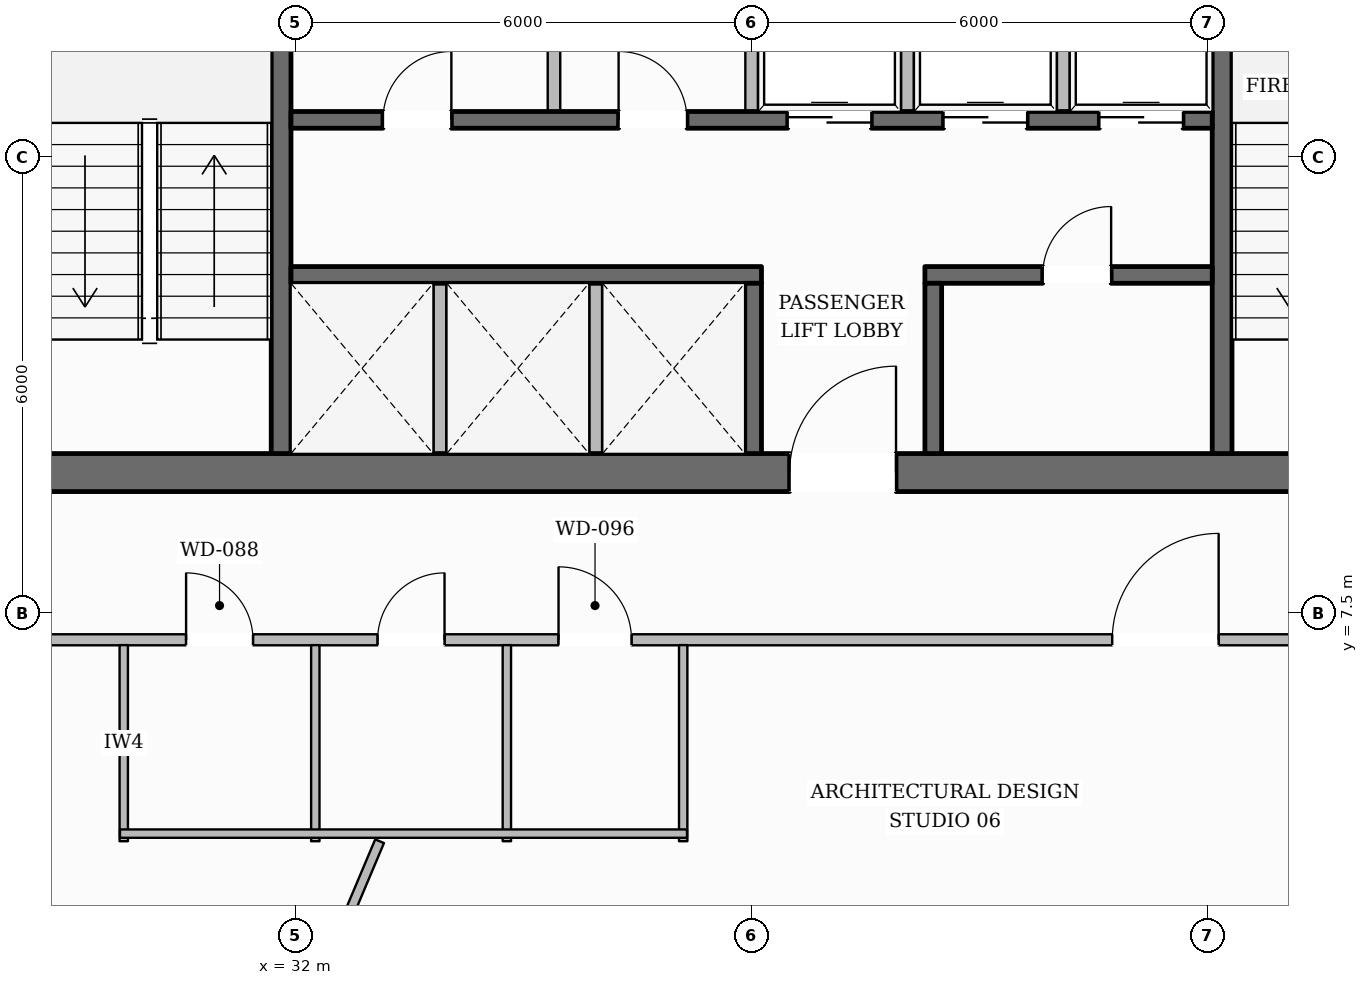
"""IFC4 building model, lengths in metres.
Left out: names, types, materials, properties, quantities, classifications, styles, units other than length and angle.
Written with IfcOpenShell. Run it as: python <this file> out.ifc"""

import sys

from ifc_helpers import new_model, si_unit, direction, frame, frame_2d, origin, place, context, subcontext, project, spatial, rectangle, extrude, element, fill, save


model = new_model("IFC4")
c1 = context("Model", 3, precision=1e-05, world=origin(), true_north=direction((0.0, 1.0)))
c2 = subcontext(c1, "Body", "Model", "MODEL_VIEW")
j1 = project(units=[si_unit("LENGTHUNIT", "METRE"), si_unit("PLANEANGLEUNIT", "RADIAN")], contexts=[c1])
p1 = place(None, origin())
s1 = spatial("IfcSite", under=j1, at=p1, CompositionType="ELEMENT")
p2 = place(p1, origin())
s2 = spatial("IfcBuilding", under=s1, at=p2, CompositionType="ELEMENT")
p3 = place(p2, frame((0.0, 0.0, 108.6)))
s3 = spatial("IfcBuildingStorey", under=s2, at=p3, CompositionType="ELEMENT", Elevation=108.6)
p4 = place(p3, frame((27.98, 9.35, 0.0), z_axis=(0.0, 0.0, 1.0), x_axis=(1.0, 0.0, 0.0)))
e1 = element("IfcWall", 1, at=p4, inside=s3, PredefinedType="SOLIDWALL", context=c2, shape_type="SweptSolid", body=[
    extrude(rectangle(XDim=20.04, YDim=0.5, at=frame_2d((10.02, 0.0))), origin(), (0.0, 0.0, 1.0), 3.6),
])
p5 = place(p4, frame((10.52, 0.0, 0.0)))
e2 = element("IfcOpeningElement", 2, at=p5, cuts=e1, PredefinedType="OPENING", context=c2, shape_type="SweptSolid", body=[
    extrude(rectangle(XDim=1.4, YDim=2.2, at=frame_2d((0.7, 1.1))), frame((0.0, 0.26, 0.0), z_axis=(0.0, -1.0, 0.0), x_axis=(1.0, 0.0, 0.0)), (0.0, 0.0, 1.0), 0.52),
])
p6 = place(p3, frame((31.81, 9.6, 0.0), z_axis=(0.0, 0.0, 1.0), x_axis=(0.0, 1.0, 0.0)))
e3 = element("IfcWall", 3, at=p6, inside=s3, PredefinedType="SHEAR", context=c2, shape_type="SweptSolid", body=[
    extrude(rectangle(XDim=13.0, YDim=0.26, at=frame_2d((6.5, 0.0))), origin(), (0.0, 0.0, 1.0), 3.6),
])
p7 = place(p6, frame((10.925, 0.0, 0.0)))
e4 = element("IfcOpeningElement", 4, at=p7, cuts=e3, PredefinedType="OPENING", context=c2, shape_type="SweptSolid", body=[
    extrude(rectangle(XDim=1.25, YDim=2.25, at=frame_2d((0.625, 1.125))), frame((0.0, 0.14, 0.0), z_axis=(0.0, -1.0, 0.0), x_axis=(1.0, 0.0, 0.0)), (0.0, 0.0, 1.0), 0.28),
])
p8 = place(p3, frame((44.19, 9.6, 0.0), z_axis=(0.0, 0.0, 1.0), x_axis=(0.0, 1.0, 0.0)))
e5 = element("IfcWall", 5, at=p8, inside=s3, PredefinedType="SHEAR", context=c2, shape_type="SweptSolid", body=[
    extrude(rectangle(XDim=13.0, YDim=0.26, at=frame_2d((6.5, 0.0))), origin(), (0.0, 0.0, 1.0), 3.6),
])
p9 = place(p8, frame((10.925, 0.0, 0.0)))
e6 = element("IfcOpeningElement", 6, at=p9, cuts=e5, PredefinedType="OPENING", context=c2, shape_type="SweptSolid", body=[
    extrude(rectangle(XDim=1.25, YDim=2.25, at=frame_2d((0.625, 1.125))), frame((0.0, 0.14, 0.0), z_axis=(0.0, -1.0, 0.0), x_axis=(1.0, 0.0, 0.0)), (0.0, 0.0, 1.0), 0.28),
])
p10 = place(p3, frame((31.94, 13.99, 0.0), z_axis=(0.0, 0.0, 1.0), x_axis=(1.0, 0.0, 0.0)))
e7 = element("IfcWall", 7, at=p10, inside=s3, PredefinedType="SOLIDWALL", context=c2, shape_type="SweptSolid", body=[
    extrude(rectangle(XDim=12.12, YDim=0.22, at=frame_2d((6.06, 0.0))), origin(), (0.0, 0.0, 1.0), 3.6),
])
p11 = place(p10, frame((1.21, 0.0, 0.0)))
e8 = element("IfcOpeningElement", 8, at=p11, cuts=e7, PredefinedType="OPENING", context=c2, shape_type="SweptSolid", body=[
    extrude(rectangle(XDim=0.9, YDim=2.1, at=frame_2d((0.45, 1.05))), frame((0.0, 0.12, 0.0), z_axis=(0.0, -1.0, 0.0), x_axis=(1.0, 0.0, 0.0)), (0.0, 0.0, 1.0), 0.24),
])
p12 = place(p10, frame((4.31, 0.0, 0.0)))
e9 = element("IfcOpeningElement", 9, at=p12, cuts=e7, PredefinedType="OPENING", context=c2, shape_type="SweptSolid", body=[
    extrude(rectangle(XDim=0.9, YDim=2.1, at=frame_2d((0.45, 1.05))), frame((0.0, 0.12, 0.0), z_axis=(0.0, -1.0, 0.0), x_axis=(1.0, 0.0, 0.0)), (0.0, 0.0, 1.0), 0.24),
])
p13 = place(p10, frame((6.535, 0.0, 0.0)))
e10 = element("IfcOpeningElement", 10, at=p13, cuts=e7, PredefinedType="OPENING", context=c2, shape_type="SweptSolid", body=[
    extrude(rectangle(XDim=1.1, YDim=2.2, at=frame_2d((0.55, 1.1))), frame((0.0, 0.12, 0.0), z_axis=(0.0, -1.0, 0.0), x_axis=(1.0, 0.0, 0.0)), (0.0, 0.0, 1.0), 0.24),
])
p14 = place(p10, frame((8.585, 0.0, 0.0)))
e11 = element("IfcOpeningElement", 11, at=p14, cuts=e7, PredefinedType="OPENING", context=c2, shape_type="SweptSolid", body=[
    extrude(rectangle(XDim=1.1, YDim=2.2, at=frame_2d((0.55, 1.1))), frame((0.0, 0.12, 0.0), z_axis=(0.0, -1.0, 0.0), x_axis=(1.0, 0.0, 0.0)), (0.0, 0.0, 1.0), 0.24),
])
p15 = place(p10, frame((10.635, 0.0, 0.0)))
e12 = element("IfcOpeningElement", 12, at=p15, cuts=e7, PredefinedType="OPENING", context=c2, shape_type="SweptSolid", body=[
    extrude(rectangle(XDim=1.1, YDim=2.2, at=frame_2d((0.55, 1.1))), frame((0.0, 0.12, 0.0), z_axis=(0.0, -1.0, 0.0), x_axis=(1.0, 0.0, 0.0)), (0.0, 0.0, 1.0), 0.24),
])
p16 = place(p3, frame((31.94, 11.95, 0.0), z_axis=(0.0, 0.0, 1.0), x_axis=(1.0, 0.0, 0.0)))
e13 = element("IfcWall", 13, at=p16, inside=s3, PredefinedType="SOLIDWALL", context=c2, shape_type="SweptSolid", body=[
    extrude(rectangle(XDim=6.19, YDim=0.22, at=frame_2d((3.095, 0.0))), origin(), (0.0, 0.0, 1.0), 3.6),
])
p17 = place(p3, frame((40.28, 11.95, 0.0), z_axis=(0.0, 0.0, 1.0), x_axis=(1.0, 0.0, 0.0)))
e14 = element("IfcWall", 14, at=p17, inside=s3, PredefinedType="SOLIDWALL", context=c2, shape_type="SweptSolid", body=[
    extrude(rectangle(XDim=3.78, YDim=0.22, at=frame_2d((1.89, 0.0))), origin(), (0.0, 0.0, 1.0), 3.6),
])
p18 = place(p17, frame((1.55, 0.0, 0.0)))
e15 = element("IfcOpeningElement", 15, at=p18, cuts=e14, PredefinedType="OPENING", context=c2, shape_type="SweptSolid", body=[
    extrude(rectangle(XDim=0.9, YDim=2.1, at=frame_2d((0.45, 1.05))), frame((0.0, 0.12, 0.0), z_axis=(0.0, -1.0, 0.0), x_axis=(1.0, 0.0, 0.0)), (0.0, 0.0, 1.0), 0.24),
])
for number, where, z_axis, x_axis in (
    (16, (38.02, 9.6, 0.0), (0.0, 0.0, 1.0), (0.0, 1.0, 0.0)),
    (17, (40.39, 9.6, 0.0), (0.0, 0.0, 1.0), (0.0, 1.0, 0.0)),
):
    element("IfcWall", number, at=place(p3, frame(where, z_axis=z_axis, x_axis=x_axis)), inside=s3, PredefinedType="SOLIDWALL", context=c2, shape_type="SweptSolid", body=[
        extrude(rectangle(XDim=2.24, YDim=0.22, at=frame_2d((1.12, 0.0))), origin(), (0.0, 0.0, 1.0), 3.6),
    ])
p19 = place(p3, frame((14.155, 13.347, 0.0), z_axis=(0.0, 0.0, 1.0), x_axis=(0.493868426836, 0.869536644986, 0.0)))
e18 = element("IfcWall", 18, at=p19, inside=s3, PredefinedType="STANDARD", context=c2, shape_type="SweptSolid", body=[
    extrude(rectangle(XDim=36.121, YDim=0.38, at=frame_2d((18.061, 0.0))), origin(), (0.0, 0.0, 1.0), 3.059),
])
p20 = place(p19, frame((31.935, 0.0, 0.65)))
e19 = element("IfcOpeningElement", 19, at=p20, cuts=e18, PredefinedType="OPENING", context=c2, shape_type="SweptSolid", body=[
    extrude(rectangle(XDim=1.55, YDim=1.75, at=frame_2d((0.775, 0.875))), frame((0.0, 0.2, 0.0), z_axis=(0.0, -1.0, 0.0), x_axis=(1.0, 0.0, 0.0)), (0.0, 0.0, 1.0), 0.4),
])
p21 = place(p19, frame((26.073, 0.0, 0.65)))
e20 = element("IfcOpeningElement", 20, at=p21, cuts=e18, PredefinedType="OPENING", context=c2, shape_type="SweptSolid", body=[
    extrude(rectangle(XDim=1.55, YDim=1.75, at=frame_2d((0.775, 0.875))), frame((0.0, 0.2, 0.0), z_axis=(0.0, -1.0, 0.0), x_axis=(1.0, 0.0, 0.0)), (0.0, 0.0, 1.0), 0.4),
])
p22 = place(p19, frame((14.352, 0.0, 0.65)))
e21 = element("IfcOpeningElement", 21, at=p22, cuts=e18, PredefinedType="OPENING", context=c2, shape_type="SweptSolid", body=[
    extrude(rectangle(XDim=1.55, YDim=1.75, at=frame_2d((0.775, 0.875))), frame((0.0, 0.2, 0.0), z_axis=(0.0, -1.0, 0.0), x_axis=(1.0, 0.0, 0.0)), (0.0, 0.0, 1.0), 0.4),
])
p23 = place(p19, frame((8.491, 0.0, 0.65)))
e22 = element("IfcOpeningElement", 22, at=p23, cuts=e18, PredefinedType="OPENING", context=c2, shape_type="SweptSolid", body=[
    extrude(rectangle(XDim=1.55, YDim=1.75, at=frame_2d((0.775, 0.875))), frame((0.0, 0.2, 0.0), z_axis=(0.0, -1.0, 0.0), x_axis=(1.0, 0.0, 0.0)), (0.0, 0.0, 1.0), 0.4),
])
p24 = place(p19, frame((2.63, 0.0, 0.65)))
e23 = element("IfcOpeningElement", 23, at=p24, cuts=e18, PredefinedType="OPENING", context=c2, shape_type="SweptSolid", body=[
    extrude(rectangle(XDim=1.55, YDim=1.75, at=frame_2d((0.775, 0.875))), frame((0.0, 0.2, 0.0), z_axis=(0.0, -1.0, 0.0), x_axis=(1.0, 0.0, 0.0)), (0.0, 0.0, 1.0), 0.4),
])
p25 = place(p3, frame((44.12, 44.689, 0.0), z_axis=(0.0, 0.0, 1.0), x_axis=(0.498376840975, -0.866960509124, 0.0)))
e24 = element("IfcWall", 24, at=p25, inside=s3, PredefinedType="STANDARD", context=c2, shape_type="SweptSolid", body=[
    extrude(rectangle(XDim=36.441, YDim=0.38, at=frame_2d((18.22, 0.0))), origin(), (0.0, 0.0, 1.0), 3.059),
])
p26 = place(p25, frame((32.234, 0.0, 0.65)))
e25 = element("IfcOpeningElement", 25, at=p26, cuts=e24, PredefinedType="OPENING", context=c2, shape_type="SweptSolid", body=[
    extrude(rectangle(XDim=1.55, YDim=1.75, at=frame_2d((0.775, 0.875))), frame((0.0, 0.2, 0.0), z_axis=(0.0, -1.0, 0.0), x_axis=(1.0, 0.0, 0.0)), (0.0, 0.0, 1.0), 0.4),
])
p27 = place(p25, frame((26.319, 0.0, 0.65)))
e26 = element("IfcOpeningElement", 26, at=p27, cuts=e24, PredefinedType="OPENING", context=c2, shape_type="SweptSolid", body=[
    extrude(rectangle(XDim=1.55, YDim=1.75, at=frame_2d((0.775, 0.875))), frame((0.0, 0.2, 0.0), z_axis=(0.0, -1.0, 0.0), x_axis=(1.0, 0.0, 0.0)), (0.0, 0.0, 1.0), 0.4),
])
p28 = place(p25, frame((14.489, 0.0, 0.65)))
e27 = element("IfcOpeningElement", 27, at=p28, cuts=e24, PredefinedType="OPENING", context=c2, shape_type="SweptSolid", body=[
    extrude(rectangle(XDim=1.55, YDim=1.75, at=frame_2d((0.775, 0.875))), frame((0.0, 0.2, 0.0), z_axis=(0.0, -1.0, 0.0), x_axis=(1.0, 0.0, 0.0)), (0.0, 0.0, 1.0), 0.4),
])
p29 = place(p25, frame((8.573, 0.0, 0.65)))
e28 = element("IfcOpeningElement", 28, at=p29, cuts=e24, PredefinedType="OPENING", context=c2, shape_type="SweptSolid", body=[
    extrude(rectangle(XDim=1.55, YDim=1.75, at=frame_2d((0.775, 0.875))), frame((0.0, 0.2, 0.0), z_axis=(0.0, -1.0, 0.0), x_axis=(1.0, 0.0, 0.0)), (0.0, 0.0, 1.0), 0.4),
])
p30 = place(p25, frame((2.658, 0.0, 0.65)))
e29 = element("IfcOpeningElement", 29, at=p30, cuts=e24, PredefinedType="OPENING", context=c2, shape_type="SweptSolid", body=[
    extrude(rectangle(XDim=1.55, YDim=1.75, at=frame_2d((0.775, 0.875))), frame((0.0, 0.2, 0.0), z_axis=(0.0, -1.0, 0.0), x_axis=(1.0, 0.0, 0.0)), (0.0, 0.0, 1.0), 0.4),
])
for number, where, z_axis, x_axis in (
    (30, (33.9, 9.55, 0.0), (0.0, 0.0, 1.0), (0.0, 1.0, 0.0)),
    (31, (35.95, 9.55, 0.0), (0.0, 0.0, 1.0), (0.0, 1.0, 0.0)),
):
    element("IfcWall", number, at=place(p3, frame(where, z_axis=z_axis, x_axis=x_axis)), inside=s3, PredefinedType="PARTITIONING", context=c2, shape_type="SweptSolid", body=[
        extrude(rectangle(XDim=2.29, YDim=0.165, at=frame_2d((1.145, 0.0))), origin(), (0.0, 0.0, 1.0), 3.6),
    ])
for number, where, z_axis, x_axis in (
    (32, (38.0, 14.1, 0.0), (0.0, 0.0, 1.0), (0.0, 1.0, 0.0)),
    (33, (35.4, 14.1, 0.0), (0.0, 0.0, 1.0), (0.0, 1.0, 0.0)),
    (34, (40.05, 14.1, 0.0), (0.0, 0.0, 1.0), (0.0, 1.0, 0.0)),
    (35, (42.1, 14.1, 0.0), (0.0, 0.0, 1.0), (0.0, 1.0, 0.0)),
):
    element("IfcWall", number, at=place(p3, frame(where, z_axis=z_axis, x_axis=x_axis)), inside=s3, PredefinedType="PARTITIONING", context=c2, shape_type="SweptSolid", body=[
        extrude(rectangle(XDim=2.24, YDim=0.165, at=frame_2d((1.12, 0.0))), origin(), (0.0, 0.0, 1.0), 3.6),
    ])
p31 = place(p3, frame((26.03, 7.15, 0.0), z_axis=(0.0, 0.0, 1.0), x_axis=(1.0, 0.0, 0.0)))
e36 = element("IfcWall", 36, at=p31, inside=s3, PredefinedType="PARTITIONING", context=c2, shape_type="SweptSolid", body=[
    extrude(rectangle(XDim=23.94, YDim=0.145, at=frame_2d((11.97, 0.0))), origin(), (0.0, 0.0, 1.0), 3.6),
])
p32 = place(p31, frame((4.53, 0.0, 0.0)))
e37 = element("IfcOpeningElement", 37, at=p32, cuts=e36, PredefinedType="OPENING", context=c2, shape_type="SweptSolid", body=[
    extrude(rectangle(XDim=0.88, YDim=2.1, at=frame_2d((0.44, 1.05))), frame((0.0, 0.083, 0.0), z_axis=(0.0, -1.0, 0.0), x_axis=(1.0, 0.0, 0.0)), (0.0, 0.0, 1.0), 0.165),
])
p33 = place(p31, frame((7.05, 0.0, 0.0)))
e38 = element("IfcOpeningElement", 38, at=p33, cuts=e36, PredefinedType="OPENING", context=c2, shape_type="SweptSolid", body=[
    extrude(rectangle(XDim=0.88, YDim=2.1, at=frame_2d((0.44, 1.05))), frame((0.0, 0.083, 0.0), z_axis=(0.0, -1.0, 0.0), x_axis=(1.0, 0.0, 0.0)), (0.0, 0.0, 1.0), 0.165),
])
p34 = place(p31, frame((9.43, 0.0, 0.0)))
e39 = element("IfcOpeningElement", 39, at=p34, cuts=e36, PredefinedType="OPENING", context=c2, shape_type="SweptSolid", body=[
    extrude(rectangle(XDim=0.96, YDim=2.1, at=frame_2d((0.48, 1.05))), frame((0.0, 0.083, 0.0), z_axis=(0.0, -1.0, 0.0), x_axis=(1.0, 0.0, 0.0)), (0.0, 0.0, 1.0), 0.165),
])
p35 = place(p31, frame((1.456, 0.0, 0.0)))
e40 = element("IfcOpeningElement", 40, at=p35, cuts=e36, PredefinedType="OPENING", context=c2, shape_type="SweptSolid", body=[
    extrude(rectangle(XDim=0.98, YDim=2.15, at=frame_2d((0.49, 1.075))), frame((0.0, 0.083, 0.0), z_axis=(0.0, -1.0, 0.0), x_axis=(1.0, 0.0, 0.0)), (0.0, 0.0, 1.0), 0.165),
])
p36 = place(p31, frame((16.714, 0.0, 0.0)))
e41 = element("IfcOpeningElement", 41, at=p36, cuts=e36, PredefinedType="OPENING", context=c2, shape_type="SweptSolid", body=[
    extrude(rectangle(XDim=1.4, YDim=2.2, at=frame_2d((0.7, 1.1))), frame((0.0, 0.083, 0.0), z_axis=(0.0, -1.0, 0.0), x_axis=(1.0, 0.0, 0.0)), (0.0, 0.0, 1.0), 0.165),
])
p37 = place(p3, frame((29.74, 4.5, 0.0), z_axis=(0.0, 0.0, 1.0), x_axis=(0.0, 1.0, 0.0)))
e42 = element("IfcWall", 42, at=p37, inside=s3, PredefinedType="PLUMBINGWALL", context=c2, shape_type="SweptSolid", body=[
    extrude(rectangle(XDim=2.58, YDim=0.11, at=frame_2d((1.29, 0.0))), origin(), (0.0, 0.0, 1.0), 3.6),
])
p38 = place(p3, frame((32.26, 4.5, 0.0), z_axis=(0.0, 0.0, 1.0), x_axis=(0.0, 1.0, 0.0)))
e43 = element("IfcWall", 43, at=p38, inside=s3, PredefinedType="PLUMBINGWALL", context=c2, shape_type="SweptSolid", body=[
    extrude(rectangle(XDim=2.58, YDim=0.11, at=frame_2d((1.29, 0.0))), origin(), (0.0, 0.0, 1.0), 3.141),
])
for number, where, z_axis, x_axis in (
    (44, (34.78, 4.5, 0.0), (0.0, 0.0, 1.0), (0.0, 1.0, 0.0)),
    (45, (37.1, 4.5, 0.0), (0.0, 0.0, 1.0), (0.0, 1.0, 0.0)),
):
    element("IfcWall", number, at=place(p3, frame(where, z_axis=z_axis, x_axis=x_axis)), inside=s3, PredefinedType="PLUMBINGWALL", context=c2, shape_type="SweptSolid", body=[
        extrude(rectangle(XDim=2.58, YDim=0.11, at=frame_2d((1.29, 0.0))), origin(), (0.0, 0.0, 1.0), 3.6),
    ])
p39 = place(p3, frame((29.69, 4.6, 0.0), z_axis=(0.0, 0.0, 1.0), x_axis=(1.0, 0.0, 0.0)))
e46 = element("IfcWall", 46, at=p39, inside=s3, PredefinedType="PLUMBINGWALL", context=c2, shape_type="SweptSolid", body=[
    extrude(rectangle(XDim=7.46, YDim=0.11, at=frame_2d((3.73, 0.0))), origin(), (0.0, 0.0, 1.0), 3.6),
])
p40 = place(p3, frame((33.106, 4.5, 0.0), z_axis=(0.0, 0.0, 1.0), x_axis=(-0.388819762507, -0.921313840276, 0.0)))
e47 = element("IfcWall", 47, at=p40, inside=s3, PredefinedType="PARTITIONING", context=c2, shape_type="SweptSolid", body=[
    extrude(rectangle(XDim=1.331, YDim=0.125, at=frame_2d((0.665, 0.0))), origin(), (0.0, 0.0, 1.0), 3.6),
])
p41 = place(p5, origin())
e48 = element("IfcDoor", 48, at=p41, inside=s3, OperationType="SINGLE_SWING_RIGHT", PredefinedType="DOOR", context=c2, shape_type="SweptSolid", body=[
    extrude(rectangle(XDim=1.4, YDim=2.2, at=frame_2d((0.7, 1.1))), frame((0.0, 0.025, 0.0), z_axis=(0.0, -1.0, 0.0), x_axis=(1.0, 0.0, 0.0)), (0.0, 0.0, 1.0), 0.05),
])
fill(e2, e48)
p42 = place(p11, origin())
e49 = element("IfcDoor", 49, at=p42, inside=s3, OperationType="SINGLE_SWING_RIGHT", PredefinedType="DOOR", context=c2, shape_type="SweptSolid", body=[
    extrude(rectangle(XDim=0.9, YDim=2.1, at=frame_2d((0.45, 1.05))), frame((0.0, 0.025, 0.0), z_axis=(0.0, -1.0, 0.0), x_axis=(1.0, 0.0, 0.0)), (0.0, 0.0, 1.0), 0.05),
])
fill(e8, e49)
p43 = place(p12, origin())
e50 = element("IfcDoor", 50, at=p43, inside=s3, OperationType="SINGLE_SWING_LEFT", PredefinedType="DOOR", context=c2, shape_type="SweptSolid", body=[
    extrude(rectangle(XDim=0.9, YDim=2.1, at=frame_2d((0.45, 1.05))), frame((0.0, 0.025, 0.0), z_axis=(0.0, -1.0, 0.0), x_axis=(1.0, 0.0, 0.0)), (0.0, 0.0, 1.0), 0.05),
])
fill(e9, e50)
p44 = place(p13, origin())
e51 = element("IfcDoor", 51, at=p44, inside=s3, OperationType="DOUBLE_DOOR_SLIDING", PredefinedType="DOOR", context=c2, shape_type="SweptSolid", body=[
    extrude(rectangle(XDim=1.1, YDim=2.2, at=frame_2d((0.55, 1.1))), frame((0.0, 0.025, 0.0), z_axis=(0.0, -1.0, 0.0), x_axis=(1.0, 0.0, 0.0)), (0.0, 0.0, 1.0), 0.05),
])
fill(e10, e51)
p45 = place(p14, origin())
e52 = element("IfcDoor", 52, at=p45, inside=s3, OperationType="DOUBLE_DOOR_SLIDING", PredefinedType="DOOR", context=c2, shape_type="SweptSolid", body=[
    extrude(rectangle(XDim=1.1, YDim=2.2, at=frame_2d((0.55, 1.1))), frame((0.0, 0.025, 0.0), z_axis=(0.0, -1.0, 0.0), x_axis=(1.0, 0.0, 0.0)), (0.0, 0.0, 1.0), 0.05),
])
fill(e11, e52)
p46 = place(p15, origin())
e53 = element("IfcDoor", 53, at=p46, inside=s3, OperationType="DOUBLE_DOOR_SLIDING", PredefinedType="DOOR", context=c2, shape_type="SweptSolid", body=[
    extrude(rectangle(XDim=1.1, YDim=2.2, at=frame_2d((0.55, 1.1))), frame((0.0, 0.025, 0.0), z_axis=(0.0, -1.0, 0.0), x_axis=(1.0, 0.0, 0.0)), (0.0, 0.0, 1.0), 0.05),
])
fill(e12, e53)
p47 = place(p18, origin())
e54 = element("IfcDoor", 54, at=p47, inside=s3, OperationType="SINGLE_SWING_RIGHT", PredefinedType="DOOR", context=c2, shape_type="SweptSolid", body=[
    extrude(rectangle(XDim=0.9, YDim=2.1, at=frame_2d((0.45, 1.05))), frame((0.0, 0.025, 0.0), z_axis=(0.0, -1.0, 0.0), x_axis=(1.0, 0.0, 0.0)), (0.0, 0.0, 1.0), 0.05),
])
fill(e15, e54)
p48 = place(p32, origin())
e55 = element("IfcDoor", 55, at=p48, inside=s3, OperationType="SINGLE_SWING_LEFT", PredefinedType="DOOR", context=c2, shape_type="SweptSolid", body=[
    extrude(rectangle(XDim=0.88, YDim=2.1, at=frame_2d((0.44, 1.05))), frame((0.0, 0.025, 0.0), z_axis=(0.0, -1.0, 0.0), x_axis=(1.0, 0.0, 0.0)), (0.0, 0.0, 1.0), 0.05),
])
fill(e37, e55)
p49 = place(p33, origin())
e56 = element("IfcDoor", 56, at=p49, inside=s3, OperationType="SINGLE_SWING_RIGHT", PredefinedType="DOOR", context=c2, shape_type="SweptSolid", body=[
    extrude(rectangle(XDim=0.88, YDim=2.1, at=frame_2d((0.44, 1.05))), frame((0.0, 0.025, 0.0), z_axis=(0.0, -1.0, 0.0), x_axis=(1.0, 0.0, 0.0)), (0.0, 0.0, 1.0), 0.05),
])
fill(e38, e56)
p50 = place(p34, origin())
e57 = element("IfcDoor", 57, at=p50, inside=s3, OperationType="SINGLE_SWING_LEFT", PredefinedType="DOOR", context=c2, shape_type="SweptSolid", body=[
    extrude(rectangle(XDim=0.96, YDim=2.1, at=frame_2d((0.48, 1.05))), frame((0.0, 0.025, 0.0), z_axis=(0.0, -1.0, 0.0), x_axis=(1.0, 0.0, 0.0)), (0.0, 0.0, 1.0), 0.05),
])
fill(e39, e57)
p51 = place(p36, origin())
e58 = element("IfcDoor", 58, at=p51, inside=s3, OperationType="SINGLE_SWING_RIGHT", PredefinedType="DOOR", context=c2, shape_type="SweptSolid", body=[
    extrude(rectangle(XDim=1.4, YDim=2.2, at=frame_2d((0.7, 1.1))), frame((0.0, 0.025, 0.0), z_axis=(0.0, -1.0, 0.0), x_axis=(1.0, 0.0, 0.0)), (0.0, 0.0, 1.0), 0.05),
])
fill(e41, e58)
save(model, sys.argv[1])
